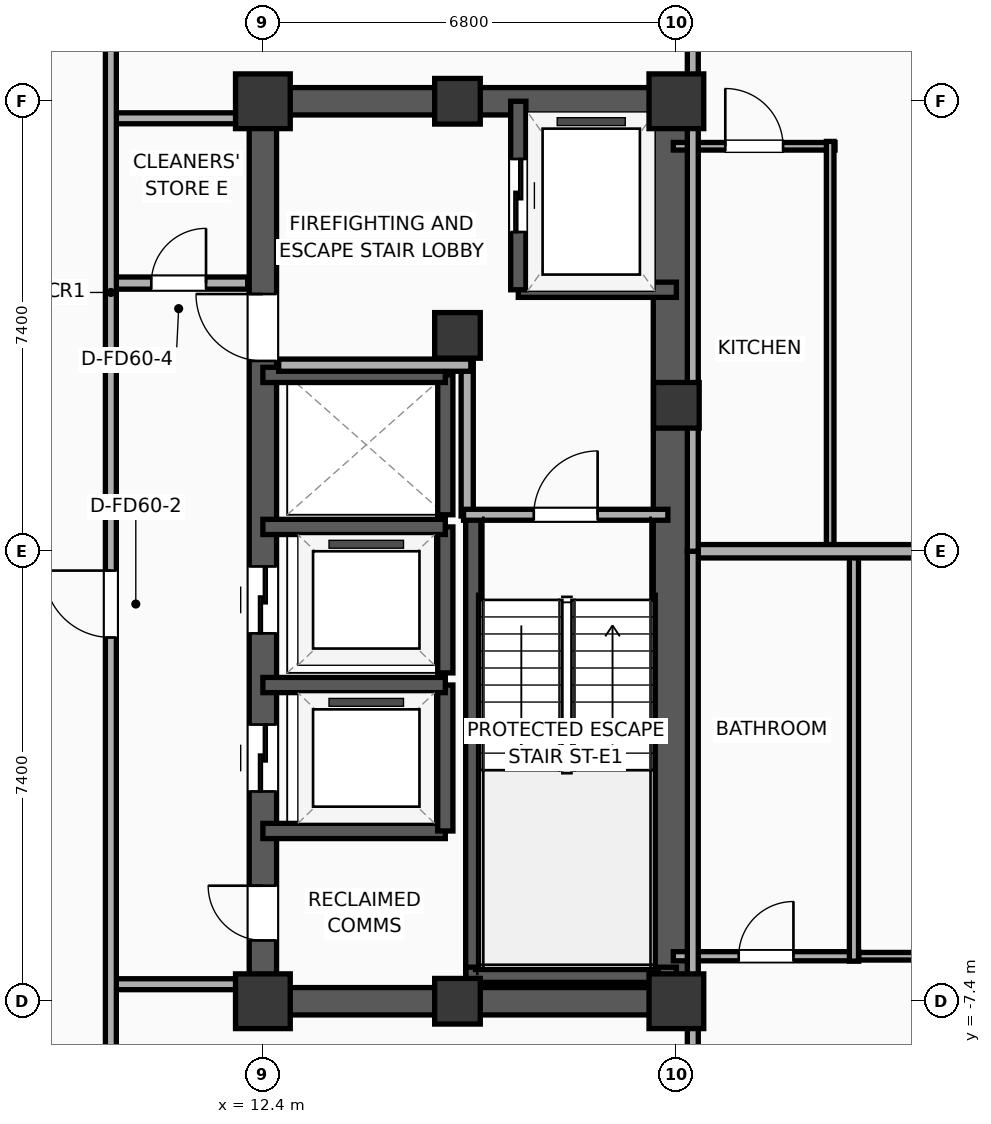
"""IFC4 building model, lengths in metres.
Left out: names, types, materials, properties, quantities, classifications, styles, units other than length and angle.
Written with IfcOpenShell. Run it as: python <this file> out.ifc"""

import sys

from ifc_helpers import new_model, si_unit, direction, frame, frame_2d, origin, origin_2d, place, context, subcontext, project, spatial, rectangle, extrude, element, fill, save


model = new_model("IFC4")
c1 = context("Model", 3, precision=1e-05, world=origin(), true_north=direction((0.0, 1.0)))
c2 = subcontext(c1, "Body", "Model", "MODEL_VIEW")
j1 = project(units=[si_unit("LENGTHUNIT", "METRE"), si_unit("PLANEANGLEUNIT", "RADIAN")], contexts=[c1])
p1 = place(None, origin())
s1 = spatial("IfcSite", under=j1, at=p1, CompositionType="ELEMENT")
p2 = place(p1, origin())
s2 = spatial("IfcBuilding", under=s1, at=p2, CompositionType="ELEMENT")
p3 = place(p2, frame((0.0, 0.0, 179.4)))
s3 = spatial("IfcBuildingStorey", under=s2, at=p3, CompositionType="ELEMENT", Elevation=179.4)
p4 = place(p3, frame((12.4, -7.4, 0.0), z_axis=(0.0, 0.0, 1.0), x_axis=(1.0, 0.0, 0.0)))
e1 = element("IfcColumn", 1, at=p4, inside=s3, PredefinedType="COLUMN", context=c2, shape_type="SweptSolid", body=[
    extrude(rectangle(XDim=0.9, YDim=0.9, at=origin_2d()), origin(), (0.0, 0.0, 1.0), 3.9),
])
p5 = place(p3, frame((15.6, 3.55, 0.0), z_axis=(0.0, 0.0, 1.0), x_axis=(1.0, 0.0, 0.0)))
e2 = element("IfcColumn", 2, at=p5, inside=s3, PredefinedType="COLUMN", context=c2, shape_type="SweptSolid", body=[
    extrude(rectangle(XDim=0.75, YDim=0.75, at=origin_2d()), origin(), (0.0, 0.0, 1.0), 3.9),
])
p6 = place(p3, frame((12.4, 7.4, 0.0), z_axis=(0.0, 0.0, 1.0), x_axis=(1.0, 0.0, 0.0)))
e3 = element("IfcColumn", 3, at=p6, inside=s3, PredefinedType="COLUMN", context=c2, shape_type="SweptSolid", body=[
    extrude(rectangle(XDim=0.9, YDim=0.9, at=origin_2d()), origin(), (0.0, 0.0, 1.0), 3.9),
])
for number, where, z_axis, x_axis in (
    (4, (15.6, -7.4, 0.0), (0.0, 0.0, 1.0), (1.0, 0.0, 0.0)),
    (5, (15.6, 7.4, 0.0), (0.0, 0.0, 1.0), (1.0, 0.0, 0.0)),
):
    element("IfcColumn", number, at=place(p3, frame(where, z_axis=z_axis, x_axis=x_axis)), inside=s3, PredefinedType="COLUMN", context=c2, shape_type="SweptSolid", body=[
        extrude(rectangle(XDim=0.75, YDim=0.75, at=origin_2d()), origin(), (0.0, 0.0, 1.0), 3.9),
    ])
p7 = place(p3, frame((19.2, -7.4, 0.0), z_axis=(0.0, 0.0, 1.0), x_axis=(1.0, 0.0, 0.0)))
e6 = element("IfcColumn", 6, at=p7, inside=s3, PredefinedType="COLUMN", context=c2, shape_type="SweptSolid", body=[
    extrude(rectangle(XDim=0.9, YDim=0.9, at=origin_2d()), origin(), (0.0, 0.0, 1.0), 3.9),
])
p8 = place(p3, frame((19.2, 2.4, 0.0), z_axis=(0.0, 0.0, 1.0), x_axis=(1.0, 0.0, 0.0)))
e7 = element("IfcColumn", 7, at=p8, inside=s3, PredefinedType="COLUMN", context=c2, shape_type="SweptSolid", body=[
    extrude(rectangle(XDim=0.75, YDim=0.75, at=origin_2d()), origin(), (0.0, 0.0, 1.0), 3.9),
])
p9 = place(p3, frame((19.2, 7.4, 0.0), z_axis=(0.0, 0.0, 1.0), x_axis=(1.0, 0.0, 0.0)))
e8 = element("IfcColumn", 8, at=p9, inside=s3, PredefinedType="COLUMN", context=c2, shape_type="SweptSolid", body=[
    extrude(rectangle(XDim=0.9, YDim=0.9, at=origin_2d()), origin(), (0.0, 0.0, 1.0), 3.9),
])
for number, where, z_axis, x_axis in (
    (9, (12.175, -7.4, 0.0), (0.0, 0.0, 1.0), (1.0, 0.0, 0.0)),
    (10, (12.175, 7.4, 0.0), (0.0, 0.0, 1.0), (1.0, 0.0, 0.0)),
):
    element("IfcWall", number, at=place(p3, frame(where, z_axis=z_axis, x_axis=x_axis)), inside=s3, PredefinedType="SHEAR", context=c2, shape_type="SweptSolid", body=[
        extrude(rectangle(XDim=7.25, YDim=0.45, at=frame_2d((3.625, 0.0))), origin(), (0.0, 0.0, 1.0), 3.65),
    ])
p10 = place(p3, frame((12.4, -7.4, 0.0), z_axis=(0.0, 0.0, 1.0), x_axis=(0.0, 1.0, 0.0)))
e11 = element("IfcWall", 11, at=p10, inside=s3, PredefinedType="SHEAR", context=c2, shape_type="SweptSolid", body=[
    extrude(rectangle(XDim=14.8, YDim=0.45, at=frame_2d((7.4, 0.0))), origin(), (0.0, 0.0, 1.0), 3.65),
])
p11 = place(p10, frame((3.45, 0.0, 0.0)))
e12 = element("IfcOpeningElement", 12, at=p11, cuts=e11, PredefinedType="OPENING", context=c2, shape_type="SweptSolid", body=[
    extrude(rectangle(XDim=1.1, YDim=2.05, at=frame_2d((0.55, 1.025))), frame((0.0, 0.235, 0.0), z_axis=(0.0, -1.0, 0.0), x_axis=(1.0, 0.0, 0.0)), (0.0, 0.0, 1.0), 0.47),
])
p12 = place(p10, frame((6.05, 0.0, 0.0)))
e13 = element("IfcOpeningElement", 13, at=p12, cuts=e11, PredefinedType="OPENING", context=c2, shape_type="SweptSolid", body=[
    extrude(rectangle(XDim=1.1, YDim=2.05, at=frame_2d((0.55, 1.025))), frame((0.0, 0.235, 0.0), z_axis=(0.0, -1.0, 0.0), x_axis=(1.0, 0.0, 0.0)), (0.0, 0.0, 1.0), 0.47),
])
p13 = place(p10, frame((10.53, 0.0, 0.0)))
e14 = element("IfcOpeningElement", 14, at=p13, cuts=e11, PredefinedType="OPENING", context=c2, shape_type="SweptSolid", body=[
    extrude(rectangle(XDim=1.1, YDim=2.05, at=frame_2d((0.55, 1.025))), frame((0.0, 0.235, 0.0), z_axis=(0.0, -1.0, 0.0), x_axis=(1.0, 0.0, 0.0)), (0.0, 0.0, 1.0), 0.47),
])
p14 = place(p10, frame((1.0, 0.0, 0.0)))
e15 = element("IfcOpeningElement", 15, at=p14, cuts=e11, PredefinedType="OPENING", context=c2, shape_type="SweptSolid", body=[
    extrude(rectangle(XDim=0.9, YDim=2.05, at=frame_2d((0.45, 1.025))), frame((0.0, 0.235, 0.0), z_axis=(0.0, -1.0, 0.0), x_axis=(1.0, 0.0, 0.0)), (0.0, 0.0, 1.0), 0.47),
])
p15 = place(p3, frame((19.145, -7.4, 0.0), z_axis=(0.0, 0.0, 1.0), x_axis=(0.0, 1.0, 0.0)))
e16 = element("IfcWall", 16, at=p15, inside=s3, PredefinedType="SHEAR", context=c2, shape_type="SweptSolid", body=[
    extrude(rectangle(XDim=14.8, YDim=0.65, at=frame_2d((7.4, 0.0))), origin(), (0.0, 0.0, 1.0), 3.65),
])
p16 = place(p3, frame((15.86, -7.085, 0.0), z_axis=(0.0, 0.0, 1.0), x_axis=(0.0, 1.0, 0.0)))
e17 = element("IfcWall", 17, at=p16, inside=s3, PredefinedType="SOLIDWALL", context=c2, shape_type="SweptSolid", body=[
    extrude(rectangle(XDim=7.685, YDim=0.25, at=frame_2d((3.843, 0.0))), origin(), (0.0, 0.0, 1.0), 3.65),
])
p17 = place(p3, frame((15.74, -6.965, 0.0), z_axis=(0.0, 0.0, 1.0), x_axis=(1.0, 0.0, 0.0)))
e18 = element("IfcWall", 18, at=p17, inside=s3, PredefinedType="SOLIDWALL", context=c2, shape_type="SweptSolid", body=[
    extrude(rectangle(XDim=3.46, YDim=0.25, at=frame_2d((1.73, 0.0))), origin(), (0.0, 0.0, 1.0), 3.65),
])
p18 = place(p3, frame((16.6, 4.3, 0.0), z_axis=(0.0, 0.0, 1.0), x_axis=(1.0, 0.0, 0.0)))
e19 = element("IfcWall", 19, at=p18, inside=s3, PredefinedType="SOLIDWALL", context=c2, shape_type="SweptSolid", body=[
    extrude(rectangle(XDim=2.6, YDim=0.25, at=frame_2d((1.3, 0.0))), origin(), (0.0, 0.0, 1.0), 3.65),
])
p19 = place(p3, frame((16.6, 7.4, 0.0), z_axis=(0.0, 0.0, 1.0), x_axis=(0.0, -1.0, 0.0)))
e20 = element("IfcWall", 20, at=p19, inside=s3, PredefinedType="SOLIDWALL", context=c2, shape_type="SweptSolid", body=[
    extrude(rectangle(XDim=3.1, YDim=0.25, at=frame_2d((1.55, 0.0))), origin(), (0.0, 0.0, 1.0), 3.65),
])
p20 = place(p19, frame((0.95, 0.0, 0.0)))
e21 = element("IfcOpeningElement", 21, at=p20, cuts=e20, PredefinedType="OPENING", context=c2, shape_type="SweptSolid", body=[
    extrude(rectangle(XDim=1.2, YDim=2.05, at=frame_2d((0.6, 1.025))), frame((0.0, 0.135, 0.0), z_axis=(0.0, -1.0, 0.0), x_axis=(1.0, 0.0, 0.0)), (0.0, 0.0, 1.0), 0.27),
])
p21 = place(p3, frame((12.4, -4.6, 0.0), z_axis=(0.0, 0.0, 1.0), x_axis=(1.0, 0.0, 0.0)))
e22 = element("IfcWall", 22, at=p21, inside=s3, PredefinedType="SOLIDWALL", context=c2, shape_type="SweptSolid", body=[
    extrude(rectangle(XDim=3.0, YDim=0.25, at=frame_2d((1.5, 0.0))), origin(), (0.0, 0.0, 1.0), 3.65),
])
p22 = place(p3, frame((15.4, -4.6, 0.0), z_axis=(0.0, 0.0, 1.0), x_axis=(0.0, 1.0, 0.0)))
e23 = element("IfcWall", 23, at=p22, inside=s3, PredefinedType="SOLIDWALL", context=c2, shape_type="SweptSolid", body=[
    extrude(rectangle(XDim=2.4, YDim=0.25, at=frame_2d((1.2, 0.0))), origin(), (0.0, 0.0, 1.0), 3.65),
])
p23 = place(p3, frame((15.4, -2.2, 0.0), z_axis=(0.0, 0.0, 1.0), x_axis=(-1.0, 0.0, 0.0)))
e24 = element("IfcWall", 24, at=p23, inside=s3, PredefinedType="SOLIDWALL", context=c2, shape_type="SweptSolid", body=[
    extrude(rectangle(XDim=3.0, YDim=0.25, at=frame_2d((1.5, 0.0))), origin(), (0.0, 0.0, 1.0), 3.65),
])
p24 = place(p3, frame((15.4, -2.0, 0.0), z_axis=(0.0, 0.0, 1.0), x_axis=(0.0, 1.0, 0.0)))
e25 = element("IfcWall", 25, at=p24, inside=s3, PredefinedType="SOLIDWALL", context=c2, shape_type="SweptSolid", body=[
    extrude(rectangle(XDim=2.4, YDim=0.25, at=frame_2d((1.2, 0.0))), origin(), (0.0, 0.0, 1.0), 3.65),
])
p25 = place(p3, frame((15.4, 0.4, 0.0), z_axis=(0.0, 0.0, 1.0), x_axis=(-1.0, 0.0, 0.0)))
e26 = element("IfcWall", 26, at=p25, inside=s3, PredefinedType="SOLIDWALL", context=c2, shape_type="SweptSolid", body=[
    extrude(rectangle(XDim=3.0, YDim=0.25, at=frame_2d((1.5, 0.0))), origin(), (0.0, 0.0, 1.0), 3.65),
])
p26 = place(p3, frame((15.4, 0.6, 0.0), z_axis=(0.0, 0.0, 1.0), x_axis=(0.0, 1.0, 0.0)))
e27 = element("IfcWall", 27, at=p26, inside=s3, PredefinedType="SOLIDWALL", context=c2, shape_type="SweptSolid", body=[
    extrude(rectangle(XDim=2.3, YDim=0.25, at=frame_2d((1.15, 0.0))), origin(), (0.0, 0.0, 1.0), 3.65),
])
p27 = place(p3, frame((15.4, 2.9, 0.0), z_axis=(0.0, 0.0, 1.0), x_axis=(-1.0, 0.0, 0.0)))
e28 = element("IfcWall", 28, at=p27, inside=s3, PredefinedType="SOLIDWALL", context=c2, shape_type="SweptSolid", body=[
    extrude(rectangle(XDim=3.0, YDim=0.25, at=frame_2d((1.5, 0.0))), origin(), (0.0, 0.0, 1.0), 3.65),
])
p28 = place(p3, frame((15.76, 0.58, 0.0), z_axis=(0.0, 0.0, 1.0), x_axis=(0.0, 1.0, 0.0)))
e29 = element("IfcWall", 29, at=p28, inside=s3, PredefinedType="PARTITIONING", context=c2, shape_type="SweptSolid", body=[
    extrude(rectangle(XDim=2.52, YDim=0.2, at=frame_2d((1.26, 0.0))), origin(), (0.0, 0.0, 1.0), 3.65),
])
p29 = place(p3, frame((12.66, 3.06, 0.0), z_axis=(0.0, 0.0, 1.0), x_axis=(1.0, 0.0, 0.0)))
e30 = element("IfcWall", 30, at=p29, inside=s3, PredefinedType="PARTITIONING", context=c2, shape_type="SweptSolid", body=[
    extrude(rectangle(XDim=3.16, YDim=0.2, at=frame_2d((1.58, 0.0))), origin(), (0.0, 0.0, 1.0), 3.65),
])
p30 = place(p3, frame((15.7, 0.6, 0.0), z_axis=(0.0, 0.0, 1.0), x_axis=(1.0, 0.0, 0.0)))
e31 = element("IfcWall", 31, at=p30, inside=s3, PredefinedType="PARTITIONING", context=c2, shape_type="SweptSolid", body=[
    extrude(rectangle(XDim=3.36, YDim=0.18, at=frame_2d((1.68, 0.0))), origin(), (0.0, 0.0, 1.0), 3.65),
])
p31 = place(p30, frame((1.155, 0.0, 0.0)))
e32 = element("IfcOpeningElement", 32, at=p31, cuts=e31, PredefinedType="OPENING", context=c2, shape_type="SweptSolid", body=[
    extrude(rectangle(XDim=1.05, YDim=2.05, at=frame_2d((0.525, 1.025))), frame((0.0, 0.1, 0.0), z_axis=(0.0, -1.0, 0.0), x_axis=(1.0, 0.0, 0.0)), (0.0, 0.0, 1.0), 0.2),
])
p32 = place(p3, frame((9.88, 4.41, 0.0), z_axis=(0.0, 0.0, 1.0), x_axis=(1.0, 0.0, 0.0)))
e33 = element("IfcWall", 33, at=p32, inside=s3, PredefinedType="PARTITIONING", context=c2, shape_type="SweptSolid", body=[
    extrude(rectangle(XDim=2.27, YDim=0.2, at=frame_2d((1.135, 0.0))), origin(), (0.0, 0.0, 1.0), 3.65),
])
p33 = place(p32, frame((0.685, 0.0, 0.0)))
e34 = element("IfcOpeningElement", 34, at=p33, cuts=e33, PredefinedType="OPENING", context=c2, shape_type="SweptSolid", body=[
    extrude(rectangle(XDim=0.9, YDim=2.05, at=frame_2d((0.45, 1.025))), frame((0.0, 0.11, 0.0), z_axis=(0.0, -1.0, 0.0), x_axis=(1.0, 0.0, 0.0)), (0.0, 0.0, 1.0), 0.22),
])
for number, where, z_axis, x_axis in (
    (35, (9.88, 7.12, 0.0), (0.0, 0.0, 1.0), (1.0, 0.0, 0.0)),
    (36, (9.88, -7.12, 0.0), (0.0, 0.0, 1.0), (1.0, 0.0, 0.0)),
):
    element("IfcWall", number, at=place(p3, frame(where, z_axis=z_axis, x_axis=x_axis)), inside=s3, PredefinedType="PARTITIONING", context=c2, shape_type="SweptSolid", body=[
        extrude(rectangle(XDim=2.27, YDim=0.18, at=frame_2d((1.135, 0.0))), origin(), (0.0, 0.0, 1.0), 3.65),
    ])
p34 = place(p3, frame((9.9, -8.68, 0.0), z_axis=(0.0, 0.0, 1.0), x_axis=(0.0, 1.0, 0.0)))
e37 = element("IfcWall", 37, at=p34, inside=s3, PredefinedType="PARTITIONING", context=c2, shape_type="SweptSolid", body=[
    extrude(rectangle(XDim=17.36, YDim=0.18, at=frame_2d((8.68, 0.0))), origin(), (0.0, 0.0, 1.0), 3.65),
])
p35 = place(p34, frame((7.262, 0.0, 0.0)))
e38 = element("IfcOpeningElement", 38, at=p35, cuts=e37, PredefinedType="OPENING", context=c2, shape_type="SweptSolid", body=[
    extrude(rectangle(XDim=1.1, YDim=2.05, at=frame_2d((0.55, 1.025))), frame((0.0, 0.1, 0.0), z_axis=(0.0, -1.0, 0.0), x_axis=(1.0, 0.0, 0.0)), (0.0, 0.0, 1.0), 0.2),
])
p36 = place(p3, frame((22.06, -6.66, 0.0), z_axis=(0.0, 0.0, 1.0), x_axis=(1.0, 0.0, 0.0)))
e39 = element("IfcWall", 39, at=p36, inside=s3, PredefinedType="PARTITIONING", context=c2, shape_type="SweptSolid", body=[
    extrude(rectangle(XDim=5.321, YDim=0.125, at=frame_2d((2.661, 0.0))), origin(), (0.0, 0.0, 1.0), 3.65),
])
p37 = place(p36, frame((1.945, 0.0, 0.0)))
e40 = element("IfcOpeningElement", 40, at=p37, cuts=e39, PredefinedType="OPENING", context=c2, shape_type="SweptSolid", body=[
    extrude(rectangle(XDim=0.9, YDim=2.05, at=frame_2d((0.45, 1.025))), frame((0.0, 0.073, 0.0), z_axis=(0.0, -1.0, 0.0), x_axis=(1.0, 0.0, 0.0)), (0.0, 0.0, 1.0), 0.145),
])
p38 = place(p3, frame((19.15, -6.66, 0.0), z_axis=(0.0, 0.0, 1.0), x_axis=(1.0, 0.0, 0.0)))
e41 = element("IfcWall", 41, at=p38, inside=s3, PredefinedType="PLUMBINGWALL", context=c2, shape_type="SweptSolid", body=[
    extrude(rectangle(XDim=3.05, YDim=0.15, at=frame_2d((1.525, 0.0))), origin(), (0.0, 0.0, 1.0), 3.04),
])
p39 = place(p38, frame((1.075, 0.0, 0.0)))
e42 = element("IfcOpeningElement", 42, at=p39, cuts=e41, PredefinedType="OPENING", context=c2, shape_type="SweptSolid", body=[
    extrude(rectangle(XDim=0.9, YDim=2.05, at=frame_2d((0.45, 1.025))), frame((0.0, 0.085, 0.0), z_axis=(0.0, -1.0, 0.0), x_axis=(1.0, 0.0, 0.0)), (0.0, 0.0, 1.0), 0.17),
])
p40 = place(p3, frame((22.12, -6.74, 0.0), z_axis=(0.0, 0.0, 1.0), x_axis=(0.0, 1.0, 0.0)))
e43 = element("IfcWall", 43, at=p40, inside=s3, PredefinedType="PLUMBINGWALL", context=c2, shape_type="SweptSolid", body=[
    extrude(rectangle(XDim=6.72, YDim=0.15, at=frame_2d((3.36, 0.0))), origin(), (0.0, 0.0, 1.0), 3.65),
])
p41 = place(p3, frame((19.15, 6.66, 0.0), z_axis=(0.0, 0.0, 1.0), x_axis=(1.0, 0.0, 0.0)))
e44 = element("IfcWall", 44, at=p41, inside=s3, PredefinedType="PARTITIONING", context=c2, shape_type="SweptSolid", body=[
    extrude(rectangle(XDim=2.659, YDim=0.125, at=frame_2d((1.33, 0.0))), origin(), (0.0, 0.0, 1.0), 3.65),
])
p42 = place(p41, frame((0.854, 0.0, 0.0)))
e45 = element("IfcOpeningElement", 45, at=p42, cuts=e44, PredefinedType="OPENING", context=c2, shape_type="SweptSolid", body=[
    extrude(rectangle(XDim=0.95, YDim=2.05, at=frame_2d((0.475, 1.025))), frame((0.0, 0.073, 0.0), z_axis=(0.0, -1.0, 0.0), x_axis=(1.0, 0.0, 0.0)), (0.0, 0.0, 1.0), 0.145),
])
p43 = place(p3, frame((21.729, 0.02, 0.0), z_axis=(0.0, 0.0, 1.0), x_axis=(0.0, 1.0, 0.0)))
e46 = element("IfcWall", 46, at=p43, inside=s3, PredefinedType="PARTITIONING", context=c2, shape_type="SweptSolid", body=[
    extrude(rectangle(XDim=6.72, YDim=0.125, at=frame_2d((3.36, 0.0))), origin(), (0.0, 0.0, 1.0), 3.65),
])
p44 = place(p3, frame((19.47, 0.0, 0.0), z_axis=(0.0, 0.0, 1.0), x_axis=(1.0, 0.0, 0.0)))
e47 = element("IfcWall", 47, at=p44, inside=s3, PredefinedType="PARTITIONING", context=c2, shape_type="SweptSolid", body=[
    extrude(rectangle(XDim=7.06, YDim=0.22, at=frame_2d((3.53, 0.0))), origin(), (0.0, 0.0, 1.0), 3.65),
])
p45 = place(p3, frame((19.47, -18.559, 0.0), z_axis=(0.0, 0.0, 1.0), x_axis=(0.0, 1.0, 0.0)))
e48 = element("IfcWall", 48, at=p45, inside=s3, PredefinedType="PARTITIONING", context=c2, shape_type="SweptSolid", body=[
    extrude(rectangle(XDim=18.559, YDim=0.18, at=frame_2d((9.279, 0.0))), origin(), (0.0, 0.0, 1.0), 3.65),
])
p46 = place(p45, frame((8.779, 0.0, 0.0)))
e49 = element("IfcOpeningElement", 49, at=p46, cuts=e48, PredefinedType="OPENING", context=c2, shape_type="SweptSolid", body=[
    extrude(rectangle(XDim=0.9, YDim=2.05, at=frame_2d((0.45, 1.025))), frame((0.0, 0.1, 0.0), z_axis=(0.0, -1.0, 0.0), x_axis=(1.0, 0.0, 0.0)), (0.0, 0.0, 1.0), 0.2),
])
p47 = place(p3, frame((19.47, 0.0, 0.0), z_axis=(0.0, 0.0, 1.0), x_axis=(0.0, 1.0, 0.0)))
e50 = element("IfcWall", 50, at=p47, inside=s3, PredefinedType="PARTITIONING", context=c2, shape_type="SweptSolid", body=[
    extrude(rectangle(XDim=22.124, YDim=0.18, at=frame_2d((11.062, 0.0))), origin(), (0.0, 0.0, 1.0), 3.04),
])
p48 = place(p47, frame((8.88, 0.0, 0.0)))
e51 = element("IfcOpeningElement", 51, at=p48, cuts=e50, PredefinedType="OPENING", context=c2, shape_type="SweptSolid", body=[
    extrude(rectangle(XDim=0.9, YDim=2.05, at=frame_2d((0.45, 1.025))), frame((0.0, 0.1, 0.0), z_axis=(0.0, -1.0, 0.0), x_axis=(1.0, 0.0, 0.0)), (0.0, 0.0, 1.0), 0.2),
])
p49 = place(p20, origin())
e52 = element("IfcDoor", 52, at=p49, inside=s3, OperationType="SLIDING_TO_LEFT", PredefinedType="DOOR", context=c2, shape_type="SweptSolid", body=[
    extrude(rectangle(XDim=1.2, YDim=2.05, at=frame_2d((0.6, 1.025))), frame((0.0, 0.025, 0.0), z_axis=(0.0, -1.0, 0.0), x_axis=(1.0, 0.0, 0.0)), (0.0, 0.0, 1.0), 0.05),
])
fill(e21, e52)
p50 = place(p11, origin())
e53 = element("IfcDoor", 53, at=p50, inside=s3, OperationType="SLIDING_TO_LEFT", PredefinedType="DOOR", context=c2, shape_type="SweptSolid", body=[
    extrude(rectangle(XDim=1.1, YDim=2.05, at=frame_2d((0.55, 1.025))), frame((0.0, 0.025, 0.0), z_axis=(0.0, -1.0, 0.0), x_axis=(1.0, 0.0, 0.0)), (0.0, 0.0, 1.0), 0.05),
])
fill(e12, e53)
p51 = place(p12, origin())
e54 = element("IfcDoor", 54, at=p51, inside=s3, OperationType="SLIDING_TO_LEFT", PredefinedType="DOOR", context=c2, shape_type="SweptSolid", body=[
    extrude(rectangle(XDim=1.1, YDim=2.05, at=frame_2d((0.55, 1.025))), frame((0.0, 0.025, 0.0), z_axis=(0.0, -1.0, 0.0), x_axis=(1.0, 0.0, 0.0)), (0.0, 0.0, 1.0), 0.05),
])
fill(e13, e54)
p52 = place(p31, origin())
e55 = element("IfcDoor", 55, at=p52, inside=s3, OperationType="SINGLE_SWING_RIGHT", PredefinedType="DOOR", context=c2, shape_type="SweptSolid", body=[
    extrude(rectangle(XDim=1.05, YDim=2.05, at=frame_2d((0.525, 1.025))), frame((0.0, 0.025, 0.0), z_axis=(0.0, -1.0, 0.0), x_axis=(1.0, 0.0, 0.0)), (0.0, 0.0, 1.0), 0.05),
])
fill(e32, e55)
p53 = place(p33, origin())
e56 = element("IfcDoor", 56, at=p53, inside=s3, OperationType="SINGLE_SWING_RIGHT", PredefinedType="DOOR", context=c2, shape_type="SweptSolid", body=[
    extrude(rectangle(XDim=0.9, YDim=2.05, at=frame_2d((0.45, 1.025))), frame((0.0, 0.025, 0.0), z_axis=(0.0, -1.0, 0.0), x_axis=(1.0, 0.0, 0.0)), (0.0, 0.0, 1.0), 0.05),
])
fill(e34, e56)
p54 = place(p35, origin())
e57 = element("IfcDoor", 57, at=p54, inside=s3, OperationType="SINGLE_SWING_RIGHT", PredefinedType="DOOR", context=c2, shape_type="SweptSolid", body=[
    extrude(rectangle(XDim=1.1, YDim=2.05, at=frame_2d((0.55, 1.025))), frame((0.0, 0.025, 0.0), z_axis=(0.0, -1.0, 0.0), x_axis=(1.0, 0.0, 0.0)), (0.0, 0.0, 1.0), 0.05),
])
fill(e38, e57)
p55 = place(p39, origin())
e58 = element("IfcDoor", 58, at=p55, inside=s3, OperationType="SINGLE_SWING_RIGHT", PredefinedType="DOOR", context=c2, shape_type="SweptSolid", body=[
    extrude(rectangle(XDim=0.9, YDim=2.05, at=frame_2d((0.45, 1.025))), frame((0.0, 0.025, 0.0), z_axis=(0.0, -1.0, 0.0), x_axis=(1.0, 0.0, 0.0)), (0.0, 0.0, 1.0), 0.05),
])
fill(e42, e58)
p56 = place(p42, origin())
e59 = element("IfcDoor", 59, at=p56, inside=s3, OperationType="SINGLE_SWING_LEFT", PredefinedType="DOOR", context=c2, shape_type="SweptSolid", body=[
    extrude(rectangle(XDim=0.95, YDim=2.05, at=frame_2d((0.475, 1.025))), frame((0.0, 0.025, 0.0), z_axis=(0.0, -1.0, 0.0), x_axis=(1.0, 0.0, 0.0)), (0.0, 0.0, 1.0), 0.05),
])
fill(e45, e59)
p57 = place(p13, origin())
e60 = element("IfcDoor", 60, at=p57, inside=s3, OperationType="SINGLE_SWING_RIGHT", PredefinedType="DOOR", context=c2, shape_type="SweptSolid", body=[
    extrude(rectangle(XDim=1.1, YDim=2.05, at=frame_2d((0.55, 1.025))), frame((0.0, 0.025, 0.0), z_axis=(0.0, -1.0, 0.0), x_axis=(1.0, 0.0, 0.0)), (0.0, 0.0, 1.0), 0.05),
])
fill(e14, e60)
p58 = place(p14, origin())
e61 = element("IfcDoor", 61, at=p58, inside=s3, OperationType="SINGLE_SWING_RIGHT", PredefinedType="DOOR", context=c2, shape_type="SweptSolid", body=[
    extrude(rectangle(XDim=0.9, YDim=2.05, at=frame_2d((0.45, 1.025))), frame((0.0, 0.025, 0.0), z_axis=(0.0, -1.0, 0.0), x_axis=(1.0, 0.0, 0.0)), (0.0, 0.0, 1.0), 0.05),
])
fill(e15, e61)
save(model, sys.argv[1])
